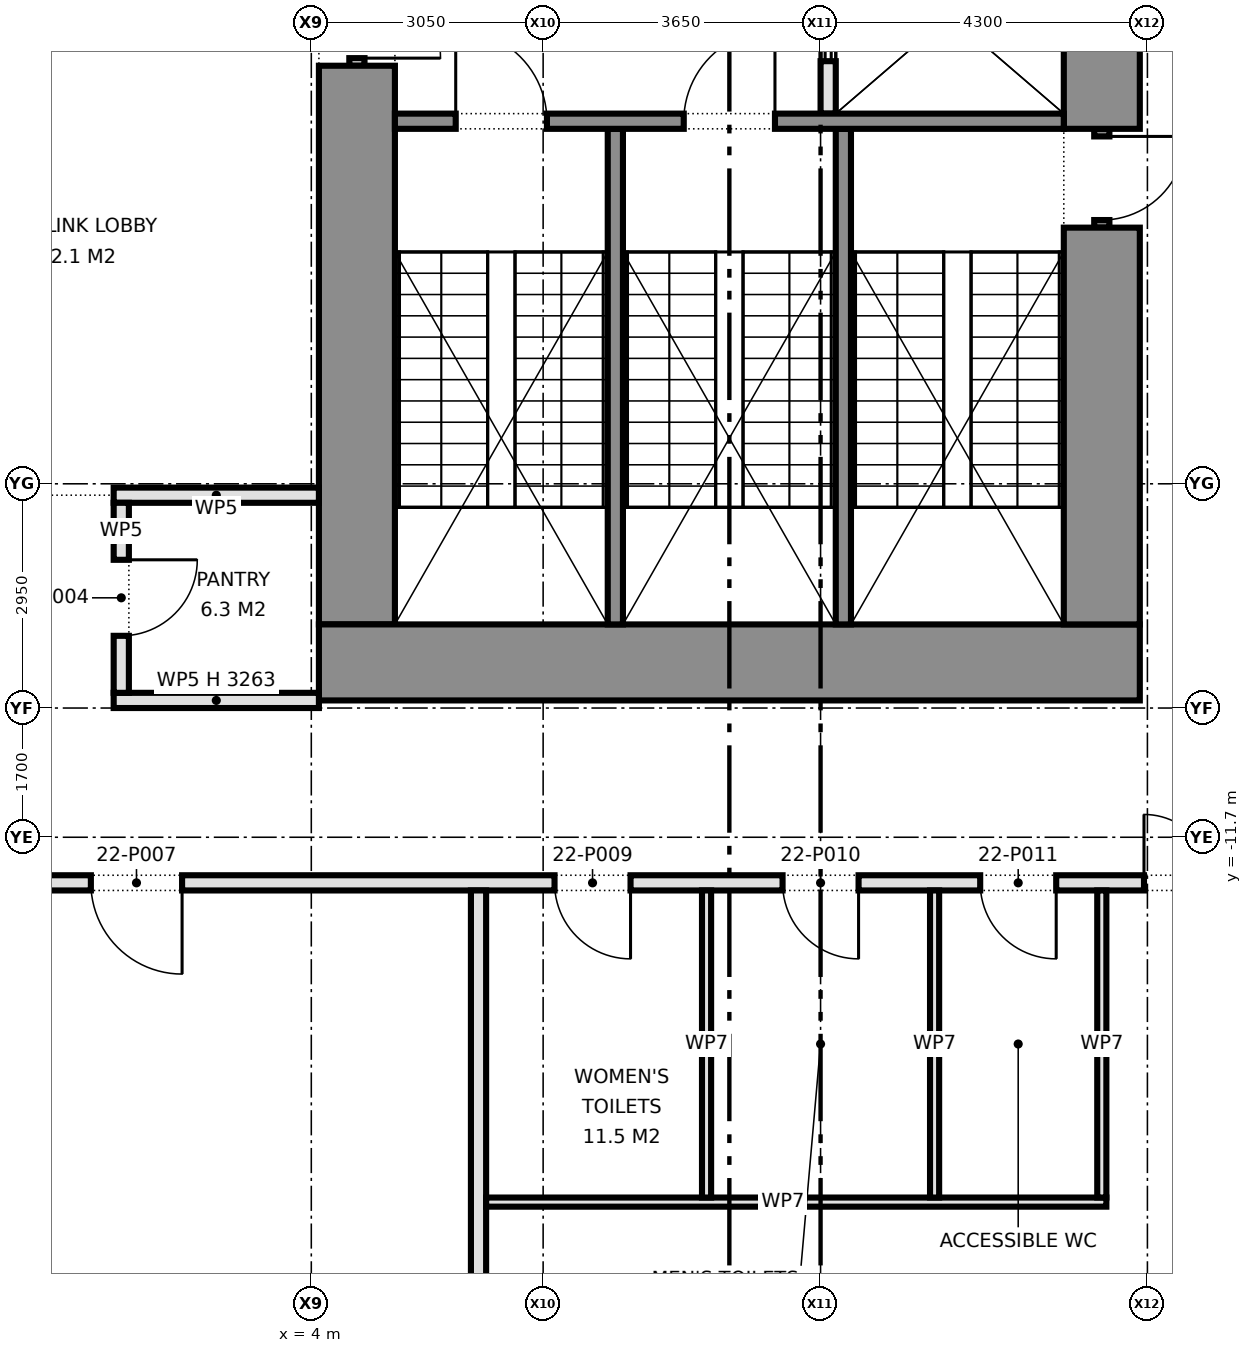
"""IFC4 building model, lengths in metres.
Left out: names, types, materials, properties, quantities, classifications, styles, units other than length and angle.
Written with IfcOpenShell. Run it as: python <this file> out.ifc"""

import sys

from ifc_helpers import new_model, si_unit, direction, frame, frame_2d, origin, place, context, subcontext, project, spatial, rectangle, extrude, element, fill, save


model = new_model("IFC4")
c1 = context("Model", 3, precision=1e-05, world=origin(), true_north=direction((0.0, 1.0)))
c2 = subcontext(c1, "Body", "Model", "MODEL_VIEW")
j1 = project(units=[si_unit("LENGTHUNIT", "METRE"), si_unit("PLANEANGLEUNIT", "RADIAN")], contexts=[c1])
p1 = place(None, origin())
s1 = spatial("IfcSite", under=j1, at=p1, CompositionType="ELEMENT")
p2 = place(p1, origin())
s2 = spatial("IfcBuilding", under=s1, at=p2, CompositionType="ELEMENT")
p3 = place(p2, frame((0.0, 0.0, 99.6)))
s3 = spatial("IfcBuildingStorey", under=s2, at=p3, CompositionType="ELEMENT", Elevation=99.6)
p4 = place(p3, frame((14.9, -9.4, 0.0), z_axis=(0.0, 0.0, 1.0), x_axis=(-1.0, 0.0, 0.0)))
e1 = element("IfcWall", 1, at=p4, inside=s3, PredefinedType="SHEAR", context=c2, shape_type="SweptSolid", body=[
    extrude(rectangle(XDim=10.8, YDim=1.0, at=frame_2d((5.4, 0.0))), origin(), (0.0, 0.0, 1.0), 4.2),
])
p5 = place(p3, frame((14.4, 3.75, 0.0), z_axis=(0.0, 0.0, 1.0), x_axis=(0.0, -1.0, 0.0)))
e2 = element("IfcWall", 2, at=p5, inside=s3, PredefinedType="SHEAR", context=c2, shape_type="SweptSolid", body=[
    extrude(rectangle(XDim=6.13, YDim=1.0, at=frame_2d((3.065, 0.0))), origin(), (0.0, 0.0, 1.0), 4.2),
])
p6 = place(p3, frame((14.4, -2.38, 0.0), z_axis=(0.0, 0.0, 1.0), x_axis=(0.0, -1.0, 0.0)))
e3 = element("IfcWall", 3, at=p6, inside=s3, PredefinedType="SHEAR", context=c2, shape_type="SweptSolid", body=[
    extrude(rectangle(XDim=1.3, YDim=0.2, at=frame_2d((0.65, 0.0))), origin(), (0.0, 0.0, 1.0), 2.4),
])
p7 = place(p6, frame((0.1, 0.0, 0.0)))
e4 = element("IfcOpeningElement", 4, at=p7, cuts=e3, PredefinedType="OPENING", context=c2, shape_type="SweptSolid", body=[
    extrude(rectangle(XDim=1.1, YDim=2.1, at=frame_2d((0.55, 1.05))), frame((0.0, 0.11, 0.0), z_axis=(0.0, -1.0, 0.0), x_axis=(1.0, 0.0, 0.0)), (0.0, 0.0, 1.0), 0.22),
])
p8 = place(p3, frame((14.4, -3.68, 0.0), z_axis=(0.0, 0.0, 1.0), x_axis=(0.0, -1.0, 0.0)))
e5 = element("IfcWall", 5, at=p8, inside=s3, PredefinedType="SHEAR", context=c2, shape_type="SweptSolid", body=[
    extrude(rectangle(XDim=5.22, YDim=1.0, at=frame_2d((2.61, 0.0))), origin(), (0.0, 0.0, 1.0), 4.2),
])
p9 = place(p3, frame((4.6, -0.25, 0.0), z_axis=(0.0, 0.0, 1.0), x_axis=(0.0, -1.0, 0.0)))
e6 = element("IfcWall", 6, at=p9, inside=s3, PredefinedType="PARTITIONING", context=c2, shape_type="SweptSolid", body=[
    extrude(rectangle(XDim=1.3, YDim=0.2, at=frame_2d((0.65, 0.0))), origin(), (0.0, 0.0, 1.0), 2.4),
])
p10 = place(p9, frame((0.1, 0.0, 0.0)))
e7 = element("IfcOpeningElement", 7, at=p10, cuts=e6, PredefinedType="OPENING", context=c2, shape_type="SweptSolid", body=[
    extrude(rectangle(XDim=1.1, YDim=2.1, at=frame_2d((0.55, 1.05))), frame((0.0, 0.11, 0.0), z_axis=(0.0, -1.0, 0.0), x_axis=(1.0, 0.0, 0.0)), (0.0, 0.0, 1.0), 0.22),
])
p11 = place(p3, frame((4.6, -1.55, 0.0), z_axis=(0.0, 0.0, 1.0), x_axis=(0.0, -1.0, 0.0)))
e8 = element("IfcWall", 8, at=p11, inside=s3, PredefinedType="SHEAR", context=c2, shape_type="SweptSolid", body=[
    extrude(rectangle(XDim=7.35, YDim=1.0, at=frame_2d((3.675, 0.0))), origin(), (0.0, 0.0, 1.0), 4.2),
])
p12 = place(p3, frame((10.8, 0.4, 0.0), z_axis=(0.0, 0.0, 1.0), x_axis=(0.0, -1.0, 0.0)))
e9 = element("IfcWall", 9, at=p12, inside=s3, PredefinedType="PARTITIONING", context=c2, shape_type="SweptSolid", body=[
    extrude(rectangle(XDim=2.58, YDim=0.2, at=frame_2d((1.29, 0.0))), origin(), (0.0, 0.0, 1.0), 4.2),
])
p13 = place(p12, frame((0.69, 0.0, 0.0)))
e10 = element("IfcOpeningElement", 10, at=p13, cuts=e9, PredefinedType="OPENING", context=c2, shape_type="SweptSolid", body=[
    extrude(rectangle(XDim=1.2, YDim=2.1, at=frame_2d((0.6, 1.05))), frame((0.0, 0.11, 0.0), z_axis=(0.0, -1.0, 0.0), x_axis=(1.0, 0.0, 0.0)), (0.0, 0.0, 1.0), 0.22),
])
p14 = place(p3, frame((13.9, -2.28, 0.0), z_axis=(0.0, 0.0, 1.0), x_axis=(-1.0, 0.0, 0.0)))
e11 = element("IfcWall", 11, at=p14, inside=s3, PredefinedType="SHEAR", context=c2, shape_type="SweptSolid", body=[
    extrude(rectangle(XDim=8.8, YDim=0.2, at=frame_2d((4.4, 0.0))), origin(), (0.0, 0.0, 1.0), 4.2),
])
p15 = place(p14, frame((3.8, 0.0, 0.0)))
e12 = element("IfcOpeningElement", 12, at=p15, cuts=e11, PredefinedType="OPENING", context=c2, shape_type="SweptSolid", body=[
    extrude(rectangle(XDim=1.2, YDim=2.1, at=frame_2d((0.6, 1.05))), frame((0.0, 0.11, 0.0), z_axis=(0.0, -1.0, 0.0), x_axis=(1.0, 0.0, 0.0)), (0.0, 0.0, 1.0), 0.22),
])
p16 = place(p14, frame((6.8, 0.0, 0.0)))
e13 = element("IfcOpeningElement", 13, at=p16, cuts=e11, PredefinedType="OPENING", context=c2, shape_type="SweptSolid", body=[
    extrude(rectangle(XDim=1.2, YDim=2.1, at=frame_2d((0.6, 1.05))), frame((0.0, 0.11, 0.0), z_axis=(0.0, -1.0, 0.0), x_axis=(1.0, 0.0, 0.0)), (0.0, 0.0, 1.0), 0.22),
])
for number, where, z_axis, x_axis in (
    (14, (11.0, -2.38, 0.0), (0.0, 0.0, 1.0), (0.0, -1.0, 0.0)),
    (15, (8.0, -2.38, 0.0), (0.0, 0.0, 1.0), (0.0, -1.0, 0.0)),
):
    element("IfcWall", number, at=place(p3, frame(where, z_axis=z_axis, x_axis=x_axis)), inside=s3, PredefinedType="SHEAR", context=c2, shape_type="SweptSolid", body=[
        extrude(rectangle(XDim=6.52, YDim=0.2, at=frame_2d((3.26, 0.0))), origin(), (0.0, 0.0, 1.0), 4.2),
    ])
p17 = place(p3, frame((-20.33, -12.3, 0.0), z_axis=(0.0, 0.0, 1.0), x_axis=(1.0, 0.0, 0.0)))
e16 = element("IfcWall", 16, at=p17, inside=s3, PredefinedType="PARTITIONING", context=c2, shape_type="SweptSolid", body=[
    extrude(rectangle(XDim=37.73, YDim=0.2, at=frame_2d((18.865, 0.0))), origin(), (0.0, 0.0, 1.0), 4.2),
])
p18 = place(p17, frame((3.69, 0.0, 0.0)))
e17 = element("IfcOpeningElement", 17, at=p18, cuts=e16, PredefinedType="OPENING", context=c2, shape_type="SweptSolid", body=[
    extrude(rectangle(XDim=1.2, YDim=2.1, at=frame_2d((0.6, 1.05))), frame((0.0, 0.11, 0.0), z_axis=(0.0, -1.0, 0.0), x_axis=(1.0, 0.0, 0.0)), (0.0, 0.0, 1.0), 0.22),
])
p19 = place(p17, frame((12.13, 0.0, 0.0)))
e18 = element("IfcOpeningElement", 18, at=p19, cuts=e16, PredefinedType="OPENING", context=c2, shape_type="SweptSolid", body=[
    extrude(rectangle(XDim=1.8, YDim=2.1, at=frame_2d((0.9, 1.05))), frame((0.0, 0.11, 0.0), z_axis=(0.0, -1.0, 0.0), x_axis=(1.0, 0.0, 0.0)), (0.0, 0.0, 1.0), 0.22),
])
p20 = place(p17, frame((21.43, 0.0, 0.0)))
e19 = element("IfcOpeningElement", 19, at=p20, cuts=e16, PredefinedType="OPENING", context=c2, shape_type="SweptSolid", body=[
    extrude(rectangle(XDim=1.2, YDim=2.1, at=frame_2d((0.6, 1.05))), frame((0.0, 0.11, 0.0), z_axis=(0.0, -1.0, 0.0), x_axis=(1.0, 0.0, 0.0)), (0.0, 0.0, 1.0), 0.22),
])
p21 = place(p17, frame((35.285, 0.0, 0.0)))
e20 = element("IfcOpeningElement", 20, at=p21, cuts=e16, PredefinedType="OPENING", context=c2, shape_type="SweptSolid", body=[
    extrude(rectangle(XDim=1.8, YDim=2.1, at=frame_2d((0.9, 1.05))), frame((0.0, 0.11, 0.0), z_axis=(0.0, -1.0, 0.0), x_axis=(1.0, 0.0, 0.0)), (0.0, 0.0, 1.0), 0.22),
])
p22 = place(p17, frame((27.53, 0.0, 0.0)))
e21 = element("IfcOpeningElement", 21, at=p22, cuts=e16, PredefinedType="OPENING", context=c2, shape_type="SweptSolid", body=[
    extrude(rectangle(XDim=1.0, YDim=2.1, at=frame_2d((0.5, 1.05))), frame((0.0, 0.11, 0.0), z_axis=(0.0, -1.0, 0.0), x_axis=(1.0, 0.0, 0.0)), (0.0, 0.0, 1.0), 0.22),
])
p23 = place(p17, frame((30.53, 0.0, 0.0)))
e22 = element("IfcOpeningElement", 22, at=p23, cuts=e16, PredefinedType="OPENING", context=c2, shape_type="SweptSolid", body=[
    extrude(rectangle(XDim=1.0, YDim=2.1, at=frame_2d((0.5, 1.05))), frame((0.0, 0.11, 0.0), z_axis=(0.0, -1.0, 0.0), x_axis=(1.0, 0.0, 0.0)), (0.0, 0.0, 1.0), 0.22),
])
p24 = place(p17, frame((33.13, 0.0, 0.0)))
e23 = element("IfcOpeningElement", 23, at=p24, cuts=e16, PredefinedType="OPENING", context=c2, shape_type="SweptSolid", body=[
    extrude(rectangle(XDim=1.0, YDim=2.1, at=frame_2d((0.5, 1.05))), frame((0.0, 0.11, 0.0), z_axis=(0.0, -1.0, 0.0), x_axis=(1.0, 0.0, 0.0)), (0.0, 0.0, 1.0), 0.22),
])
p25 = place(p3, frame((1.4, -9.9, 0.0), z_axis=(0.0, 0.0, 1.0), x_axis=(1.0, 0.0, 0.0)))
e24 = element("IfcWall", 24, at=p25, inside=s3, PredefinedType="PARTITIONING", context=c2, shape_type="SweptSolid", body=[
    extrude(rectangle(XDim=2.7, YDim=0.2, at=frame_2d((1.35, 0.0))), origin(), (0.0, 0.0, 1.0), 3.263),
])
p26 = place(p3, frame((1.4, -7.2, 0.0), z_axis=(0.0, 0.0, 1.0), x_axis=(1.0, 0.0, 0.0)))
e25 = element("IfcWall", 25, at=p26, inside=s3, PredefinedType="PARTITIONING", context=c2, shape_type="SweptSolid", body=[
    extrude(rectangle(XDim=2.7, YDim=0.2, at=frame_2d((1.35, 0.0))), origin(), (0.0, 0.0, 1.0), 4.2),
])
p27 = place(p3, frame((6.2, -29.23, 0.0), z_axis=(0.0, 0.0, 1.0), x_axis=(0.0, 1.0, 0.0)))
e26 = element("IfcWall", 26, at=p27, inside=s3, PredefinedType="PARTITIONING", context=c2, shape_type="SweptSolid", body=[
    extrude(rectangle(XDim=16.83, YDim=0.2, at=frame_2d((8.415, 0.0))), origin(), (0.0, 0.0, 1.0), 4.2),
])
p28 = place(p3, frame((1.5, -9.8, 0.0), z_axis=(0.0, 0.0, 1.0), x_axis=(0.0, 1.0, 0.0)))
e27 = element("IfcWall", 27, at=p28, inside=s3, PredefinedType="PARTITIONING", context=c2, shape_type="SweptSolid", body=[
    extrude(rectangle(XDim=2.5, YDim=0.2, at=frame_2d((1.25, 0.0))), origin(), (0.0, 0.0, 1.0), 4.2),
])
p29 = place(p28, frame((0.75, 0.0, 0.0)))
e28 = element("IfcOpeningElement", 28, at=p29, cuts=e27, PredefinedType="OPENING", context=c2, shape_type="SweptSolid", body=[
    extrude(rectangle(XDim=1.0, YDim=2.1, at=frame_2d((0.5, 1.05))), frame((0.0, 0.11, 0.0), z_axis=(0.0, -1.0, 0.0), x_axis=(1.0, 0.0, 0.0)), (0.0, 0.0, 1.0), 0.22),
])
p30 = place(p3, frame((6.3, -16.5, 0.0), z_axis=(0.0, 0.0, 1.0), x_axis=(1.0, 0.0, 0.0)))
e29 = element("IfcWall", 29, at=p30, inside=s3, PredefinedType="PARTITIONING", context=c2, shape_type="SweptSolid", body=[
    extrude(rectangle(XDim=8.16, YDim=0.12, at=frame_2d((4.08, 0.0))), origin(), (0.0, 0.0, 1.0), 4.2),
])
for number, where, z_axis, x_axis in (
    (30, (14.4, -16.44, 0.0), (0.0, 0.0, 1.0), (0.0, 1.0, 0.0)),
    (31, (12.2, -16.44, 0.0), (0.0, 0.0, 1.0), (0.0, 1.0, 0.0)),
    (32, (9.2, -16.44, 0.0), (0.0, 0.0, 1.0), (0.0, 1.0, 0.0)),
):
    element("IfcWall", number, at=place(p3, frame(where, z_axis=z_axis, x_axis=x_axis)), inside=s3, PredefinedType="PARTITIONING", context=c2, shape_type="SweptSolid", body=[
        extrude(rectangle(XDim=4.04, YDim=0.12, at=frame_2d((2.02, 0.0))), origin(), (0.0, 0.0, 1.0), 4.2),
    ])
p31 = place(p7, origin())
e33 = element("IfcDoor", 33, at=p31, inside=s3, OperationType="SINGLE_SWING_LEFT", PredefinedType="DOOR", context=c2, shape_type="SweptSolid", body=[
    extrude(rectangle(XDim=1.1, YDim=2.1, at=frame_2d((0.55, 1.05))), frame((0.0, 0.025, 0.0), z_axis=(0.0, -1.0, 0.0), x_axis=(1.0, 0.0, 0.0)), (0.0, 0.0, 1.0), 0.05),
])
fill(e4, e33)
p32 = place(p10, origin())
e34 = element("IfcDoor", 34, at=p32, inside=s3, OperationType="SINGLE_SWING_RIGHT", PredefinedType="DOOR", context=c2, shape_type="SweptSolid", body=[
    extrude(rectangle(XDim=1.1, YDim=2.1, at=frame_2d((0.55, 1.05))), frame((0.0, 0.025, 0.0), z_axis=(0.0, -1.0, 0.0), x_axis=(1.0, 0.0, 0.0)), (0.0, 0.0, 1.0), 0.05),
])
fill(e7, e34)
p33 = place(p13, origin())
e35 = element("IfcDoor", 35, at=p33, inside=s3, OperationType="DOUBLE_DOOR_SLIDING", PredefinedType="DOOR", context=c2, shape_type="SweptSolid", body=[
    extrude(rectangle(XDim=1.2, YDim=2.1, at=frame_2d((0.6, 1.05))), frame((0.0, 0.025, 0.0), z_axis=(0.0, -1.0, 0.0), x_axis=(1.0, 0.0, 0.0)), (0.0, 0.0, 1.0), 0.05),
])
fill(e10, e35)
p34 = place(p15, frame((1.2, 0.0, 0.0), z_axis=(0.0, 0.0, 1.0), x_axis=(-1.0, 0.0, 0.0)))
e36 = element("IfcDoor", 36, at=p34, inside=s3, OperationType="SINGLE_SWING_RIGHT", PredefinedType="DOOR", context=c2, shape_type="SweptSolid", body=[
    extrude(rectangle(XDim=1.2, YDim=2.1, at=frame_2d((0.6, 1.05))), frame((0.0, 0.025, 0.0), z_axis=(0.0, -1.0, 0.0), x_axis=(1.0, 0.0, 0.0)), (0.0, 0.0, 1.0), 0.05),
])
fill(e12, e36)
p35 = place(p16, frame((1.2, 0.0, 0.0), z_axis=(0.0, 0.0, 1.0), x_axis=(-1.0, 0.0, 0.0)))
e37 = element("IfcDoor", 37, at=p35, inside=s3, OperationType="SINGLE_SWING_LEFT", PredefinedType="DOOR", context=c2, shape_type="SweptSolid", body=[
    extrude(rectangle(XDim=1.2, YDim=2.1, at=frame_2d((0.6, 1.05))), frame((0.0, 0.025, 0.0), z_axis=(0.0, -1.0, 0.0), x_axis=(1.0, 0.0, 0.0)), (0.0, 0.0, 1.0), 0.05),
])
fill(e13, e37)
p36 = place(p29, frame((1.0, 0.0, 0.0), z_axis=(0.0, 0.0, 1.0), x_axis=(-1.0, 0.0, 0.0)))
e38 = element("IfcDoor", 38, at=p36, inside=s3, OperationType="SINGLE_SWING_LEFT", PredefinedType="DOOR", context=c2, shape_type="SweptSolid", body=[
    extrude(rectangle(XDim=1.0, YDim=2.1, at=frame_2d((0.5, 1.05))), frame((0.0, 0.025, 0.0), z_axis=(0.0, -1.0, 0.0), x_axis=(1.0, 0.0, 0.0)), (0.0, 0.0, 1.0), 0.05),
])
fill(e28, e38)
p37 = place(p20, frame((1.2, 0.0, 0.0), z_axis=(0.0, 0.0, 1.0), x_axis=(-1.0, 0.0, 0.0)))
e39 = element("IfcDoor", 39, at=p37, inside=s3, OperationType="SINGLE_SWING_LEFT", PredefinedType="DOOR", context=c2, shape_type="SweptSolid", body=[
    extrude(rectangle(XDim=1.2, YDim=2.1, at=frame_2d((0.6, 1.05))), frame((0.0, 0.025, 0.0), z_axis=(0.0, -1.0, 0.0), x_axis=(1.0, 0.0, 0.0)), (0.0, 0.0, 1.0), 0.05),
])
fill(e19, e39)
p38 = place(p21, origin())
e40 = element("IfcDoor", 40, at=p38, inside=s3, OperationType="DOUBLE_DOOR_SINGLE_SWING", PredefinedType="DOOR", context=c2, shape_type="SweptSolid", body=[
    extrude(rectangle(XDim=1.8, YDim=2.1, at=frame_2d((0.9, 1.05))), frame((0.0, 0.025, 0.0), z_axis=(0.0, -1.0, 0.0), x_axis=(1.0, 0.0, 0.0)), (0.0, 0.0, 1.0), 0.05),
])
fill(e20, e40)
p39 = place(p22, frame((1.0, 0.0, 0.0), z_axis=(0.0, 0.0, 1.0), x_axis=(-1.0, 0.0, 0.0)))
e41 = element("IfcDoor", 41, at=p39, inside=s3, OperationType="SINGLE_SWING_LEFT", PredefinedType="DOOR", context=c2, shape_type="SweptSolid", body=[
    extrude(rectangle(XDim=1.0, YDim=2.1, at=frame_2d((0.5, 1.05))), frame((0.0, 0.025, 0.0), z_axis=(0.0, -1.0, 0.0), x_axis=(1.0, 0.0, 0.0)), (0.0, 0.0, 1.0), 0.05),
])
fill(e21, e41)
p40 = place(p23, frame((1.0, 0.0, 0.0), z_axis=(0.0, 0.0, 1.0), x_axis=(-1.0, 0.0, 0.0)))
e42 = element("IfcDoor", 42, at=p40, inside=s3, OperationType="SINGLE_SWING_LEFT", PredefinedType="DOOR", context=c2, shape_type="SweptSolid", body=[
    extrude(rectangle(XDim=1.0, YDim=2.1, at=frame_2d((0.5, 1.05))), frame((0.0, 0.025, 0.0), z_axis=(0.0, -1.0, 0.0), x_axis=(1.0, 0.0, 0.0)), (0.0, 0.0, 1.0), 0.05),
])
fill(e22, e42)
p41 = place(p24, frame((1.0, 0.0, 0.0), z_axis=(0.0, 0.0, 1.0), x_axis=(-1.0, 0.0, 0.0)))
e43 = element("IfcDoor", 43, at=p41, inside=s3, OperationType="SINGLE_SWING_LEFT", PredefinedType="DOOR", context=c2, shape_type="SweptSolid", body=[
    extrude(rectangle(XDim=1.0, YDim=2.1, at=frame_2d((0.5, 1.05))), frame((0.0, 0.025, 0.0), z_axis=(0.0, -1.0, 0.0), x_axis=(1.0, 0.0, 0.0)), (0.0, 0.0, 1.0), 0.05),
])
fill(e23, e43)
save(model, sys.argv[1])
